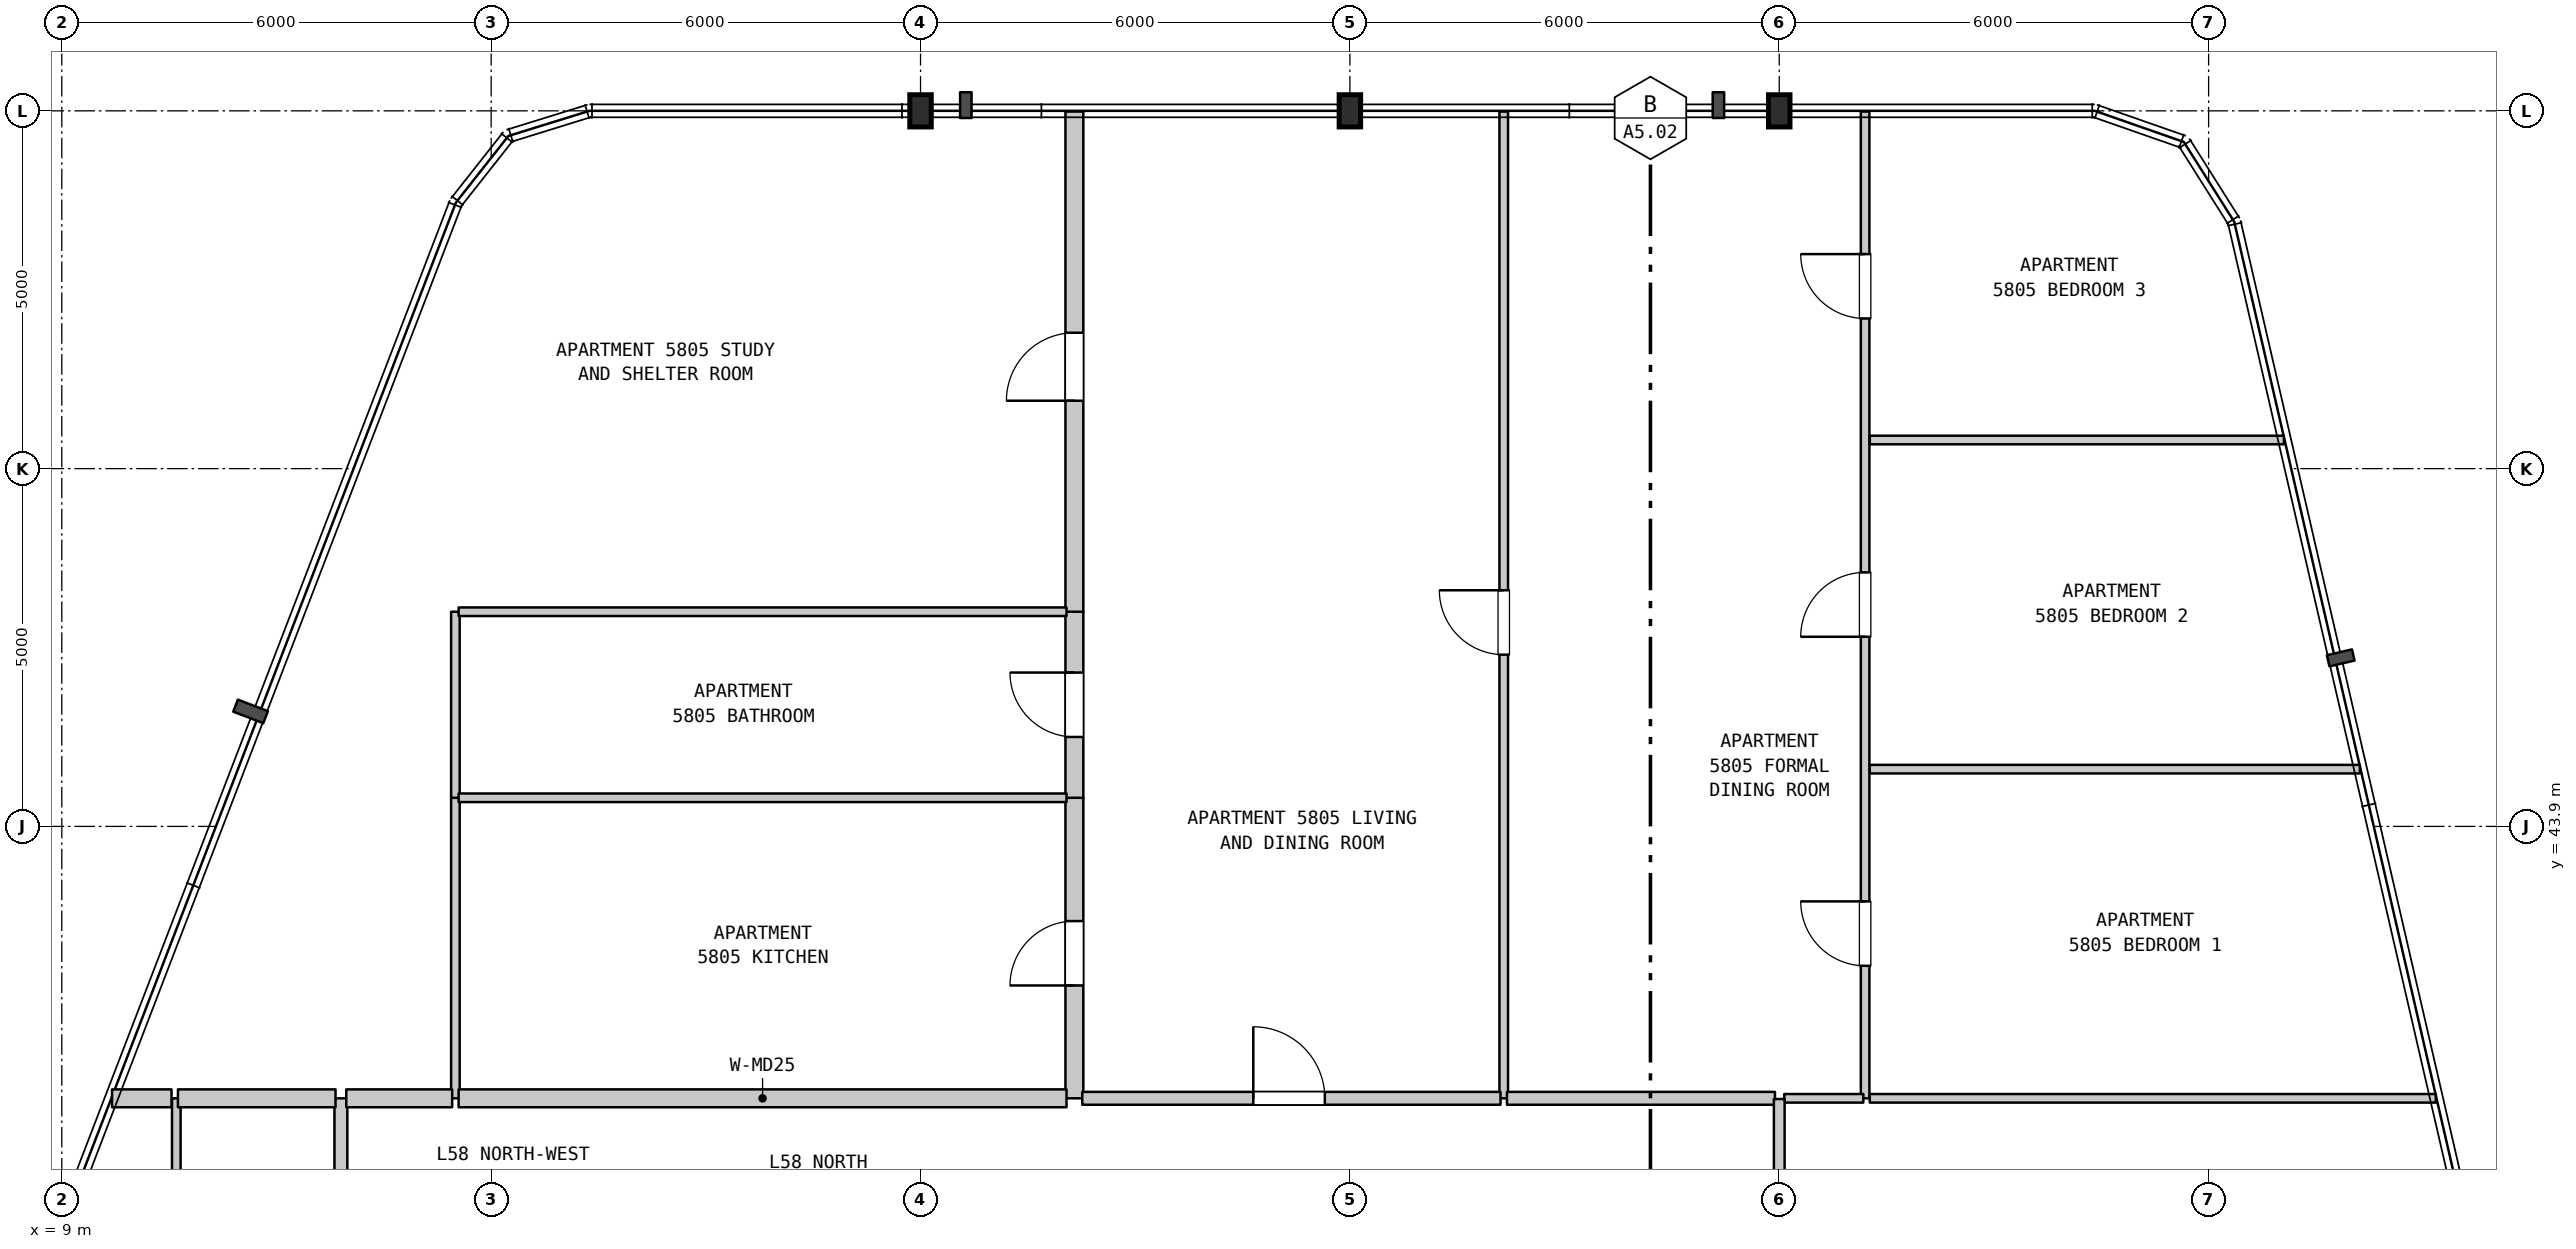
"""IFC4 building model, lengths in metres.
Left out: names, types, materials, properties, quantities, classifications, styles, units other than length and angle.
Written with IfcOpenShell. Run it as: python <this file> out.ifc"""

import sys

from ifc_helpers import new_model, si_unit, direction, frame, frame_2d, origin, origin_2d, place, context, subcontext, project, spatial, rectangle, i_section, extrude, element, fill, save


model = new_model("IFC4")
c1 = context("Model", 3, precision=1e-05, world=origin(), true_north=direction((0.0, 1.0)))
c2 = subcontext(c1, "Body", "Model", "MODEL_VIEW")
j1 = project(units=[si_unit("LENGTHUNIT", "METRE"), si_unit("PLANEANGLEUNIT", "RADIAN")], contexts=[c1])
p1 = place(None, origin())
s1 = spatial("IfcSite", under=j1, at=p1, CompositionType="ELEMENT")
p2 = place(p1, origin())
s2 = spatial("IfcBuilding", under=s1, at=p2, CompositionType="ELEMENT")
p3 = place(p2, frame((0.0, 0.0, 233.9)))
s3 = spatial("IfcBuildingStorey", under=s2, at=p3, CompositionType="ELEMENT", Elevation=233.9)
for number, where, z_axis, x_axis in (
    (1, (21.0, 53.9, 0.0), (0.0, 0.0, 1.0), (1.0, 0.0, 0.0)),
    (2, (27.0, 53.9, 0.0), (0.0, 0.0, 1.0), (1.0, 0.0, 0.0)),
    (3, (33.0, 53.9, 0.0), (0.0, 0.0, 1.0), (1.0, 0.0, 0.0)),
):
    element("IfcColumn", number, at=place(p3, frame(where, z_axis=z_axis, x_axis=x_axis)), inside=s3, PredefinedType="COLUMN", context=c2, shape_type="SweptSolid", body=[
        extrude(i_section(OverallWidth=0.3, OverallDepth=0.45, WebThickness=0.014, FlangeThickness=0.026, FilletRadius=0.027, at=origin_2d()), origin(), (0.0, 0.0, 1.0), 3.7),
    ])
p4 = place(p3, frame((10.6, 31.5, 0.0), z_axis=(0.0, 0.0, 1.0), x_axis=(0.0, 1.0, 0.0)))
e4 = element("IfcWall", 4, at=p4, inside=s3, PredefinedType="PARTITIONING", context=c2, shape_type="SweptSolid", body=[
    extrude(rectangle(XDim=8.6, YDim=0.12, at=frame_2d((4.3, 0.0))), origin(), (0.0, 0.0, 1.0), 3.28),
])
p5 = place(p3, frame((12.9, 31.5, 0.0), z_axis=(0.0, 0.0, 1.0), x_axis=(0.0, 1.0, 0.0)))
e5 = element("IfcWall", 5, at=p5, inside=s3, PredefinedType="STANDARD", context=c2, shape_type="SweptSolid", body=[
    extrude(rectangle(XDim=8.6, YDim=0.18, at=frame_2d((4.3, 0.0))), origin(), (0.0, 0.0, 1.0), 3.28),
])
p6 = place(p3, frame((14.5, 40.1, 0.0), z_axis=(0.0, 0.0, 1.0), x_axis=(0.0, 1.0, 0.0)))
e6 = element("IfcWall", 6, at=p6, inside=s3, PredefinedType="PARTITIONING", context=c2, shape_type="SweptSolid", body=[
    extrude(rectangle(XDim=4.2, YDim=0.12, at=frame_2d((2.1, 0.0))), origin(), (0.0, 0.0, 1.0), 3.28),
])
p7 = place(p3, frame((14.5, 44.3, 0.0), z_axis=(0.0, 0.0, 1.0), x_axis=(0.0, 1.0, 0.0)))
e7 = element("IfcWall", 7, at=p7, inside=s3, PredefinedType="PARTITIONING", context=c2, shape_type="SweptSolid", body=[
    extrude(rectangle(XDim=2.6, YDim=0.12, at=frame_2d((1.3, 0.0))), origin(), (0.0, 0.0, 1.0), 3.28),
])
p8 = place(p3, frame((23.15, 40.1, 0.0), z_axis=(0.0, 0.0, 1.0), x_axis=(0.0, 1.0, 0.0)))
e8 = element("IfcWall", 8, at=p8, inside=s3, PredefinedType="STANDARD", context=c2, shape_type="SweptSolid", body=[
    extrude(rectangle(XDim=4.2, YDim=0.25, at=frame_2d((2.1, 0.0))), origin(), (0.0, 0.0, 1.0), 3.28),
])
p9 = place(p8, frame((1.577, 0.0, 0.0)))
e9 = element("IfcOpeningElement", 9, at=p9, cuts=e8, PredefinedType="OPENING", context=c2, shape_type="SweptSolid", body=[
    extrude(rectangle(XDim=0.9, YDim=2.15, at=frame_2d((0.45, 1.075))), frame((0.0, 0.135, 0.0), z_axis=(0.0, -1.0, 0.0), x_axis=(1.0, 0.0, 0.0)), (0.0, 0.0, 1.0), 0.27),
])
p10 = place(p3, frame((23.15, 44.3, 0.0), z_axis=(0.0, 0.0, 1.0), x_axis=(0.0, 1.0, 0.0)))
e10 = element("IfcWall", 10, at=p10, inside=s3, PredefinedType="STANDARD", context=c2, shape_type="SweptSolid", body=[
    extrude(rectangle(XDim=2.6, YDim=0.25, at=frame_2d((1.3, 0.0))), origin(), (0.0, 0.0, 1.0), 3.28),
])
p11 = place(p10, frame((0.85, 0.0, 0.0)))
e11 = element("IfcOpeningElement", 11, at=p11, cuts=e10, PredefinedType="OPENING", context=c2, shape_type="SweptSolid", body=[
    extrude(rectangle(XDim=0.9, YDim=2.1, at=frame_2d((0.45, 1.05))), frame((0.0, 0.135, 0.0), z_axis=(0.0, -1.0, 0.0), x_axis=(1.0, 0.0, 0.0)), (0.0, 0.0, 1.0), 0.27),
])
p12 = place(p3, frame((23.15, 46.9, 0.0), z_axis=(0.0, 0.0, 1.0), x_axis=(0.0, 1.0, 0.0)))
e12 = element("IfcWall", 12, at=p12, inside=s3, PredefinedType="STANDARD", context=c2, shape_type="SweptSolid", body=[
    extrude(rectangle(XDim=6.99, YDim=0.25, at=frame_2d((3.495, 0.0))), origin(), (0.0, 0.0, 1.0), 3.28),
])
p13 = place(p12, frame((2.949, 0.0, 0.0)))
e13 = element("IfcOpeningElement", 13, at=p13, cuts=e12, PredefinedType="OPENING", context=c2, shape_type="SweptSolid", body=[
    extrude(rectangle(XDim=0.95, YDim=2.15, at=frame_2d((0.475, 1.075))), frame((0.0, 0.135, 0.0), z_axis=(0.0, -1.0, 0.0), x_axis=(1.0, 0.0, 0.0)), (0.0, 0.0, 1.0), 0.27),
])
p14 = place(p3, frame((29.15, 40.1, 0.0), z_axis=(0.0, 0.0, 1.0), x_axis=(0.0, 1.0, 0.0)))
e14 = element("IfcWall", 14, at=p14, inside=s3, PredefinedType="PARTITIONING", context=c2, shape_type="SweptSolid", body=[
    extrude(rectangle(XDim=13.79, YDim=0.12, at=frame_2d((6.895, 0.0))), origin(), (0.0, 0.0, 1.0), 3.28),
])
p15 = place(p14, frame((6.2, 0.0, 0.0)))
e15 = element("IfcOpeningElement", 15, at=p15, cuts=e14, PredefinedType="OPENING", context=c2, shape_type="SweptSolid", body=[
    extrude(rectangle(XDim=0.9, YDim=2.15, at=frame_2d((0.45, 1.075))), frame((0.0, 0.07, 0.0), z_axis=(0.0, -1.0, 0.0), x_axis=(1.0, 0.0, 0.0)), (0.0, 0.0, 1.0), 0.14),
])
p16 = place(p3, frame((34.2, 40.1, 0.0), z_axis=(0.0, 0.0, 1.0), x_axis=(0.0, 1.0, 0.0)))
e16 = element("IfcWall", 16, at=p16, inside=s3, PredefinedType="PARTITIONING", context=c2, shape_type="SweptSolid", body=[
    extrude(rectangle(XDim=13.79, YDim=0.12, at=frame_2d((6.895, 0.0))), origin(), (0.0, 0.0, 1.0), 3.28),
])
p17 = place(p16, frame((1.852, 0.0, 0.0)))
e17 = element("IfcOpeningElement", 17, at=p17, cuts=e16, PredefinedType="OPENING", context=c2, shape_type="SweptSolid", body=[
    extrude(rectangle(XDim=0.9, YDim=2.15, at=frame_2d((0.45, 1.075))), frame((0.0, 0.07, 0.0), z_axis=(0.0, -1.0, 0.0), x_axis=(1.0, 0.0, 0.0)), (0.0, 0.0, 1.0), 0.14),
])
p18 = place(p16, frame((6.45, 0.0, 0.0)))
e18 = element("IfcOpeningElement", 18, at=p18, cuts=e16, PredefinedType="OPENING", context=c2, shape_type="SweptSolid", body=[
    extrude(rectangle(XDim=0.9, YDim=2.15, at=frame_2d((0.45, 1.075))), frame((0.0, 0.07, 0.0), z_axis=(0.0, -1.0, 0.0), x_axis=(1.0, 0.0, 0.0)), (0.0, 0.0, 1.0), 0.14),
])
p19 = place(p16, frame((10.898, 0.0, 0.0)))
e19 = element("IfcOpeningElement", 19, at=p19, cuts=e16, PredefinedType="OPENING", context=c2, shape_type="SweptSolid", body=[
    extrude(rectangle(XDim=0.9, YDim=2.15, at=frame_2d((0.45, 1.075))), frame((0.0, 0.07, 0.0), z_axis=(0.0, -1.0, 0.0), x_axis=(1.0, 0.0, 0.0)), (0.0, 0.0, 1.0), 0.14),
])
p20 = place(p3, frame((9.702, 40.1, 0.0), z_axis=(0.0, 0.0, 1.0), x_axis=(1.0, 0.0, 0.0)))
e20 = element("IfcWall", 20, at=p20, inside=s3, PredefinedType="STANDARD", context=c2, shape_type="SweptSolid", body=[
    extrude(rectangle(XDim=0.831, YDim=0.25, at=frame_2d((0.416, 0.0))), origin(), (0.0, 0.0, 1.0), 3.28),
])
p21 = place(p3, frame((10.623, 40.1, 0.0), z_axis=(0.0, 0.0, 1.0), x_axis=(1.0, 0.0, 0.0)))
e21 = element("IfcWall", 21, at=p21, inside=s3, PredefinedType="STANDARD", context=c2, shape_type="SweptSolid", body=[
    extrude(rectangle(XDim=2.202, YDim=0.25, at=frame_2d((1.101, 0.0))), origin(), (0.0, 0.0, 1.0), 3.28),
])
p22 = place(p3, frame((12.975, 40.1, 0.0), z_axis=(0.0, 0.0, 1.0), x_axis=(1.0, 0.0, 0.0)))
e22 = element("IfcWall", 22, at=p22, inside=s3, PredefinedType="STANDARD", context=c2, shape_type="SweptSolid", body=[
    extrude(rectangle(XDim=1.48, YDim=0.25, at=frame_2d((0.74, 0.0))), origin(), (0.0, 0.0, 1.0), 3.28),
])
p23 = place(p3, frame((14.545, 40.1, 0.0), z_axis=(0.0, 0.0, 1.0), x_axis=(1.0, 0.0, 0.0)))
e23 = element("IfcWall", 23, at=p23, inside=s3, PredefinedType="STANDARD", context=c2, shape_type="SweptSolid", body=[
    extrude(rectangle(XDim=8.495, YDim=0.25, at=frame_2d((4.248, 0.0))), origin(), (0.0, 0.0, 1.0), 3.28),
])
p24 = place(p3, frame((23.26, 40.1, 0.0), z_axis=(0.0, 0.0, 1.0), x_axis=(1.0, 0.0, 0.0)))
e24 = element("IfcWall", 24, at=p24, inside=s3, PredefinedType="STANDARD", context=c2, shape_type="SweptSolid", body=[
    extrude(rectangle(XDim=5.845, YDim=0.18, at=frame_2d((2.922, 0.0))), origin(), (0.0, 0.0, 1.0), 3.28),
])
p25 = place(p24, frame((2.39, 0.0, 0.0)))
e25 = element("IfcOpeningElement", 25, at=p25, cuts=e24, PredefinedType="OPENING", context=c2, shape_type="SweptSolid", body=[
    extrude(rectangle(XDim=1.0, YDim=2.15, at=frame_2d((0.5, 1.075))), frame((0.0, 0.1, 0.0), z_axis=(0.0, -1.0, 0.0), x_axis=(1.0, 0.0, 0.0)), (0.0, 0.0, 1.0), 0.2),
])
p26 = place(p3, frame((29.195, 40.1, 0.0), z_axis=(0.0, 0.0, 1.0), x_axis=(1.0, 0.0, 0.0)))
e26 = element("IfcWall", 26, at=p26, inside=s3, PredefinedType="STANDARD", context=c2, shape_type="SweptSolid", body=[
    extrude(rectangle(XDim=3.745, YDim=0.18, at=frame_2d((1.873, 0.0))), origin(), (0.0, 0.0, 1.0), 3.28),
])
p27 = place(p3, frame((33.07, 40.1, 0.0), z_axis=(0.0, 0.0, 1.0), x_axis=(1.0, 0.0, 0.0)))
e27 = element("IfcWall", 27, at=p27, inside=s3, PredefinedType="PARTITIONING", context=c2, shape_type="SweptSolid", body=[
    extrude(rectangle(XDim=1.105, YDim=0.12, at=frame_2d((0.552, 0.0))), origin(), (0.0, 0.0, 1.0), 3.28),
])
p28 = place(p3, frame((34.265, 40.1, 0.0), z_axis=(0.0, 0.0, 1.0), x_axis=(1.0, 0.0, 0.0)))
e28 = element("IfcWall", 28, at=p28, inside=s3, PredefinedType="PARTITIONING", context=c2, shape_type="SweptSolid", body=[
    extrude(rectangle(XDim=7.91, YDim=0.12, at=frame_2d((3.955, 0.0))), origin(), (0.0, 0.0, 1.0), 3.28),
])
p29 = place(p3, frame((14.545, 44.3, 0.0), z_axis=(0.0, 0.0, 1.0), x_axis=(1.0, 0.0, 0.0)))
e29 = element("IfcWall", 29, at=p29, inside=s3, PredefinedType="PARTITIONING", context=c2, shape_type="SweptSolid", body=[
    extrude(rectangle(XDim=8.495, YDim=0.12, at=frame_2d((4.248, 0.0))), origin(), (0.0, 0.0, 1.0), 3.28),
])
p30 = place(p3, frame((34.265, 44.7, 0.0), z_axis=(0.0, 0.0, 1.0), x_axis=(1.0, 0.0, 0.0)))
e30 = element("IfcWall", 30, at=p30, inside=s3, PredefinedType="PARTITIONING", context=c2, shape_type="SweptSolid", body=[
    extrude(rectangle(XDim=6.848, YDim=0.12, at=frame_2d((3.424, 0.0))), origin(), (0.0, 0.0, 1.0), 3.28),
])
p31 = place(p3, frame((14.545, 46.9, 0.0), z_axis=(0.0, 0.0, 1.0), x_axis=(1.0, 0.0, 0.0)))
e31 = element("IfcWall", 31, at=p31, inside=s3, PredefinedType="PARTITIONING", context=c2, shape_type="SweptSolid", body=[
    extrude(rectangle(XDim=8.495, YDim=0.12, at=frame_2d((4.248, 0.0))), origin(), (0.0, 0.0, 1.0), 3.28),
])
p32 = place(p3, frame((34.265, 49.3, 0.0), z_axis=(0.0, 0.0, 1.0), x_axis=(1.0, 0.0, 0.0)))
e32 = element("IfcWall", 32, at=p32, inside=s3, PredefinedType="PARTITIONING", context=c2, shape_type="SweptSolid", body=[
    extrude(rectangle(XDim=5.787, YDim=0.12, at=frame_2d((2.894, 0.0))), origin(), (0.0, 0.0, 1.0), 3.28),
])
p33 = place(p3, frame((33.0, 37.9, 0.0), z_axis=(0.0, 0.0, 1.0), x_axis=(0.0, 1.0, 0.0)))
e33 = element("IfcWall", 33, at=p33, inside=s3, PredefinedType="STANDARD", context=c2, shape_type="SweptSolid", body=[
    extrude(rectangle(XDim=2.19, YDim=0.15, at=frame_2d((1.095, 0.0))), origin(), (0.0, 0.0, 1.0), 2.68),
])
p34 = place(p9, origin())
e34 = element("IfcDoor", 34, at=p34, inside=s3, OperationType="SINGLE_SWING_LEFT", PredefinedType="DOOR", context=c2, shape_type="SweptSolid", body=[
    extrude(rectangle(XDim=0.9, YDim=2.15, at=frame_2d((0.45, 1.075))), frame((0.0, 0.025, 0.0), z_axis=(0.0, -1.0, 0.0), x_axis=(1.0, 0.0, 0.0)), (0.0, 0.0, 1.0), 0.05),
])
fill(e9, e34)
p35 = place(p11, origin())
e35 = element("IfcDoor", 35, at=p35, inside=s3, OperationType="SINGLE_SWING_RIGHT", PredefinedType="DOOR", context=c2, shape_type="SweptSolid", body=[
    extrude(rectangle(XDim=0.9, YDim=2.1, at=frame_2d((0.45, 1.05))), frame((0.0, 0.025, 0.0), z_axis=(0.0, -1.0, 0.0), x_axis=(1.0, 0.0, 0.0)), (0.0, 0.0, 1.0), 0.05),
])
fill(e11, e35)
p36 = place(p13, origin())
e36 = element("IfcDoor", 36, at=p36, inside=s3, OperationType="SINGLE_SWING_LEFT", PredefinedType="DOOR", context=c2, shape_type="SweptSolid", body=[
    extrude(rectangle(XDim=0.95, YDim=2.15, at=frame_2d((0.475, 1.075))), frame((0.0, 0.025, 0.0), z_axis=(0.0, -1.0, 0.0), x_axis=(1.0, 0.0, 0.0)), (0.0, 0.0, 1.0), 0.05),
])
fill(e13, e36)
p37 = place(p15, origin())
e37 = element("IfcDoor", 37, at=p37, inside=s3, OperationType="SINGLE_SWING_RIGHT", PredefinedType="DOOR", context=c2, shape_type="SweptSolid", body=[
    extrude(rectangle(XDim=0.9, YDim=2.15, at=frame_2d((0.45, 1.075))), frame((0.0, 0.025, 0.0), z_axis=(0.0, -1.0, 0.0), x_axis=(1.0, 0.0, 0.0)), (0.0, 0.0, 1.0), 0.05),
])
fill(e15, e37)
p38 = place(p17, origin())
e38 = element("IfcDoor", 38, at=p38, inside=s3, OperationType="SINGLE_SWING_RIGHT", PredefinedType="DOOR", context=c2, shape_type="SweptSolid", body=[
    extrude(rectangle(XDim=0.9, YDim=2.15, at=frame_2d((0.45, 1.075))), frame((0.0, 0.025, 0.0), z_axis=(0.0, -1.0, 0.0), x_axis=(1.0, 0.0, 0.0)), (0.0, 0.0, 1.0), 0.05),
])
fill(e17, e38)
p39 = place(p18, origin())
e39 = element("IfcDoor", 39, at=p39, inside=s3, OperationType="SINGLE_SWING_LEFT", PredefinedType="DOOR", context=c2, shape_type="SweptSolid", body=[
    extrude(rectangle(XDim=0.9, YDim=2.15, at=frame_2d((0.45, 1.075))), frame((0.0, 0.025, 0.0), z_axis=(0.0, -1.0, 0.0), x_axis=(1.0, 0.0, 0.0)), (0.0, 0.0, 1.0), 0.05),
])
fill(e18, e39)
p40 = place(p19, origin())
e40 = element("IfcDoor", 40, at=p40, inside=s3, OperationType="SINGLE_SWING_RIGHT", PredefinedType="DOOR", context=c2, shape_type="SweptSolid", body=[
    extrude(rectangle(XDim=0.9, YDim=2.15, at=frame_2d((0.45, 1.075))), frame((0.0, 0.025, 0.0), z_axis=(0.0, -1.0, 0.0), x_axis=(1.0, 0.0, 0.0)), (0.0, 0.0, 1.0), 0.05),
])
fill(e19, e40)
p41 = place(p25, origin())
e41 = element("IfcDoor", 41, at=p41, inside=s3, OperationType="SINGLE_SWING_LEFT", PredefinedType="DOOR", context=c2, shape_type="SweptSolid", body=[
    extrude(rectangle(XDim=1.0, YDim=2.15, at=frame_2d((0.5, 1.075))), frame((0.0, 0.025, 0.0), z_axis=(0.0, -1.0, 0.0), x_axis=(1.0, 0.0, 0.0)), (0.0, 0.0, 1.0), 0.05),
])
fill(e25, e41)
save(model, sys.argv[1])
